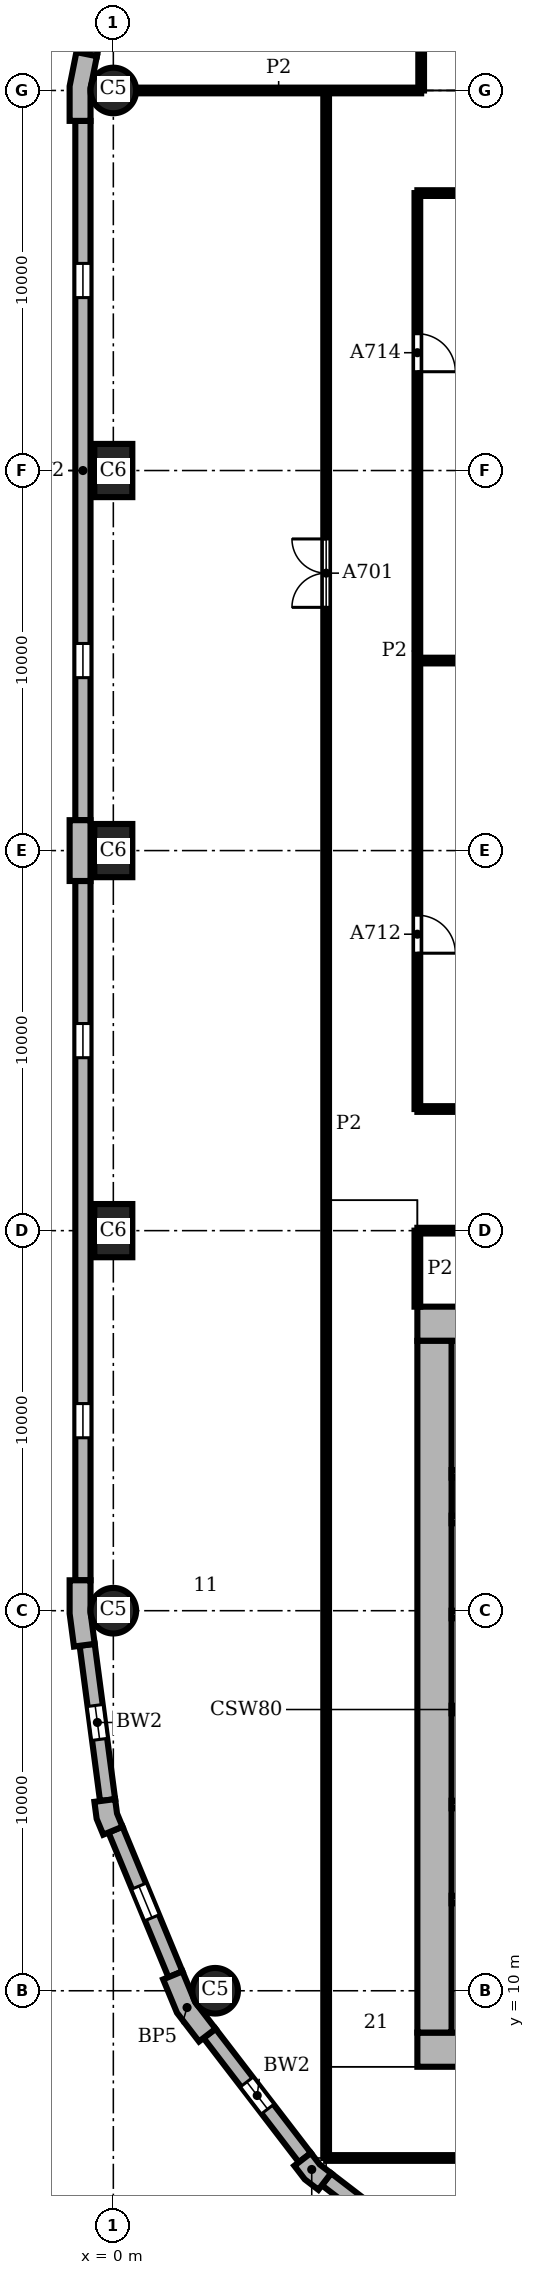
"""IFC4 building model, lengths in metres.
Left out: names, types, materials, properties, quantities, classifications, styles, units other than length and angle.
Written with IfcOpenShell. Run it as: python <this file> out.ifc"""

import sys

from ifc_helpers import new_model, si_unit, direction, frame, frame_2d, origin, origin_2d, place, context, subcontext, project, spatial, polyline, rectangle, circle, outline, extrude, element, fill, save


model = new_model("IFC4")
c1 = context("Model", 3, precision=1e-05, world=origin(), true_north=direction((0.0, 1.0)))
c2 = subcontext(c1, "Body", "Model", "MODEL_VIEW")
j1 = project(units=[si_unit("LENGTHUNIT", "METRE"), si_unit("PLANEANGLEUNIT", "RADIAN")], contexts=[c1])
p1 = place(None, origin())
s1 = spatial("IfcSite", under=j1, at=p1, CompositionType="ELEMENT")
p2 = place(p1, origin())
s2 = spatial("IfcBuilding", under=s1, at=p2, CompositionType="ELEMENT")
p3 = place(p2, frame((0.0, 0.0, 82.2)))
s3 = spatial("IfcBuildingStorey", under=s2, at=p3, CompositionType="ELEMENT", Elevation=82.2)
p4 = place(p3, frame((0.0, 60.0, 0.0), z_axis=(0.0, 0.0, 1.0), x_axis=(1.0, 0.0, 0.0)))
e1 = element("IfcColumn", 1, at=p4, inside=s3, PredefinedType="COLUMN", context=c2, shape_type="SweptSolid", body=[
    extrude(circle(Radius=0.6, at=origin_2d()), origin(), (0.0, 0.0, 1.0), 3.9),
])
for number, where, z_axis, x_axis in (
    (2, (0.0, 50.0, 0.0), (0.0, 0.0, 1.0), (0.0, 1.0, 0.0)),
    (3, (0.0, 40.0, 0.0), (0.0, 0.0, 1.0), (0.0, 1.0, 0.0)),
    (4, (0.0, 30.0, 0.0), (0.0, 0.0, 1.0), (0.0, 1.0, 0.0)),
):
    element("IfcColumn", number, at=place(p3, frame(where, z_axis=z_axis, x_axis=x_axis)), inside=s3, PredefinedType="COLUMN", context=c2, shape_type="SweptSolid", body=[
        extrude(rectangle(XDim=1.4, YDim=1.0, at=origin_2d()), origin(), (0.0, 0.0, 1.0), 3.9),
    ])
for number, where, z_axis, x_axis in (
    (5, (0.0, 20.0, 0.0), (0.0, 0.0, 1.0), (1.0, 0.0, 0.0)),
    (6, (2.679, 10.0, 0.0), (0.0, 0.0, 1.0), (1.0, 0.0, 0.0)),
):
    element("IfcColumn", number, at=place(p3, frame(where, z_axis=z_axis, x_axis=x_axis)), inside=s3, PredefinedType="COLUMN", context=c2, shape_type="SweptSolid", body=[
        extrude(circle(Radius=0.6, at=origin_2d()), origin(), (0.0, 0.0, 1.0), 3.9),
    ])
for number, where, z_axis, x_axis in (
    (7, (8.0, 8.45, 0.0), (0.0, 0.0, 1.0), (1.0, 0.0, 0.0)),
    (8, (28.0, 27.55, 0.0), (0.0, 0.0, 1.0), (-1.0, 0.0, 0.0)),
):
    element("IfcWall", number, at=place(p3, frame(where, z_axis=z_axis, x_axis=x_axis)), inside=s3, PredefinedType="SHEAR", context=c2, shape_type="SweptSolid", body=[
        extrude(rectangle(XDim=20.0, YDim=0.9, at=frame_2d((10.0, 0.0))), origin(), (0.0, 0.0, 1.0), 3.9),
    ])
p5 = place(p3, frame((8.45, 27.1, 0.0), z_axis=(0.0, 0.0, 1.0), x_axis=(0.0, -1.0, 0.0)))
e9 = element("IfcWall", 9, at=p5, inside=s3, PredefinedType="SHEAR", context=c2, shape_type="SweptSolid", body=[
    extrude(rectangle(XDim=18.2, YDim=0.9, at=frame_2d((9.1, 0.0))), origin(), (0.0, 0.0, 1.0), 3.9),
])
p6 = place(p3, origin())
e10 = element("IfcWall", 10, at=p6, inside=s3, PredefinedType="SOLIDWALL", context=c2, shape_type="SweptSolid", body=[
    extrude(outline(polyline([(-0.825, 60.98), (-0.972, 61.009), (-1.15, 60.113), (-1.15, 59.2), (-1.0, 59.2), (-0.6, 59.2), (-0.6, 60.059), (-0.432, 60.902), (-0.825, 60.98)])), origin(), (0.0, 0.0, 1.0), 3.9),
])
e11 = element("IfcWall", 11, at=p6, inside=s3, PredefinedType="SOLIDWALL", context=c2, shape_type="SweptSolid", body=[
    extrude(outline(polyline([(-1.0, 40.8), (-1.15, 40.8), (-1.15, 40.0), (-1.15, 39.2), (-1.0, 39.2), (-0.6, 39.2), (-0.6, 40.0), (-0.6, 40.8), (-1.0, 40.8)])), origin(), (0.0, 0.0, 1.0), 3.9),
])
e12 = element("IfcWall", 12, at=p6, inside=s3, PredefinedType="SOLIDWALL", context=c2, shape_type="SweptSolid", body=[
    extrude(outline(polyline([(-1.0, 20.8), (-1.15, 20.8), (-1.15, 19.925), (-1.036, 19.057), (-0.887, 19.076), (-0.49, 19.128), (-0.6, 19.961), (-0.6, 20.8), (-1.0, 20.8)])), origin(), (0.0, 0.0, 1.0), 3.9),
])
e13 = element("IfcWall", 13, at=p6, inside=s3, PredefinedType="SOLIDWALL", context=c2, shape_type="SweptSolid", body=[
    extrude(outline(polyline([(-0.349, 14.99), (-0.498, 14.971), (-0.439, 14.523), (-0.266, 14.106), (-0.128, 14.164), (0.242, 14.317), (0.097, 14.667), (0.047, 15.043), (-0.349, 14.99)])), origin(), (0.0, 0.0, 1.0), 3.9),
])
e14 = element("IfcWall", 14, at=p6, inside=s3, PredefinedType="SOLIDWALL", context=c2, shape_type="SweptSolid", body=[
    extrude(outline(polyline([(1.449, 10.356), (1.311, 10.299), (1.675, 9.42), (2.254, 8.665), (2.373, 8.757), (2.69, 9.0), (2.155, 9.698), (1.819, 10.51), (1.449, 10.356)])), origin(), (0.0, 0.0, 1.0), 3.9),
])
e15 = element("IfcWall", 15, at=p6, inside=s3, PredefinedType="SOLIDWALL", context=c2, shape_type="SweptSolid", body=[
    extrude(outline(polyline([(4.882, 5.487), (4.763, 5.396), (5.038, 5.038), (5.396, 4.763), (5.487, 4.882), (5.731, 5.199), (5.43, 5.43), (5.199, 5.731), (4.882, 5.487)])), origin(), (0.0, 0.0, 1.0), 3.9),
])
p7 = place(p3, frame((0.299, 65.602, 0.0), z_axis=(0.0, 0.0, 1.0), x_axis=(-0.195098533057, -0.98078364709, 0.0)))
e16 = element("IfcWall", 16, at=p7, inside=s3, PredefinedType="SOLIDWALL", context=c2, shape_type="SweptSolid", body=[
    extrude(rectangle(XDim=4.753, YDim=0.4, at=frame_2d((2.376, 0.0))), origin(), (0.0, 0.0, 1.0), 3.9),
])
p8 = place(p7, frame((0.226, 0.0, 0.9)))
e17 = element("IfcOpeningElement", 17, at=p8, cuts=e16, PredefinedType="OPENING", context=c2, shape_type="SweptSolid", body=[
    extrude(rectangle(XDim=4.3, YDim=2.35, at=frame_2d((2.15, 1.175))), frame((0.0, 0.21, 0.0), z_axis=(0.0, -1.0, 0.0), x_axis=(1.0, 0.0, 0.0)), (0.0, 0.0, 1.0), 0.42),
])
p9 = place(p3, frame((-0.8, 59.2, 0.0), z_axis=(0.0, 0.0, 1.0), x_axis=(0.0, -1.0, 0.0)))
e18 = element("IfcWall", 18, at=p9, inside=s3, PredefinedType="SOLIDWALL", context=c2, shape_type="SweptSolid", body=[
    extrude(rectangle(XDim=18.4, YDim=0.4, at=frame_2d((9.2, 0.0))), origin(), (0.0, 0.0, 1.0), 3.9),
])
p10 = place(p9, frame((3.75, 0.0, 0.9)))
e19 = element("IfcOpeningElement", 19, at=p10, cuts=e18, PredefinedType="OPENING", context=c2, shape_type="SweptSolid", body=[
    extrude(rectangle(XDim=0.9, YDim=2.35, at=frame_2d((0.45, 1.175))), frame((0.0, 0.21, 0.0), z_axis=(0.0, -1.0, 0.0), x_axis=(1.0, 0.0, 0.0)), (0.0, 0.0, 1.0), 0.42),
])
p11 = place(p9, frame((13.75, 0.0, 0.9)))
e20 = element("IfcOpeningElement", 20, at=p11, cuts=e18, PredefinedType="OPENING", context=c2, shape_type="SweptSolid", body=[
    extrude(rectangle(XDim=0.9, YDim=2.35, at=frame_2d((0.45, 1.175))), frame((0.0, 0.21, 0.0), z_axis=(0.0, -1.0, 0.0), x_axis=(1.0, 0.0, 0.0)), (0.0, 0.0, 1.0), 0.42),
])
p12 = place(p3, frame((-0.8, 39.2, 0.0), z_axis=(0.0, 0.0, 1.0), x_axis=(0.0, -1.0, 0.0)))
e21 = element("IfcWall", 21, at=p12, inside=s3, PredefinedType="SOLIDWALL", context=c2, shape_type="SweptSolid", body=[
    extrude(rectangle(XDim=18.4, YDim=0.4, at=frame_2d((9.2, 0.0))), origin(), (0.0, 0.0, 1.0), 3.9),
])
p13 = place(p12, frame((3.75, 0.0, 0.9)))
e22 = element("IfcOpeningElement", 22, at=p13, cuts=e21, PredefinedType="OPENING", context=c2, shape_type="SweptSolid", body=[
    extrude(rectangle(XDim=0.9, YDim=2.35, at=frame_2d((0.45, 1.175))), frame((0.0, 0.21, 0.0), z_axis=(0.0, -1.0, 0.0), x_axis=(1.0, 0.0, 0.0)), (0.0, 0.0, 1.0), 0.42),
])
p14 = place(p12, frame((13.75, 0.0, 0.9)))
e23 = element("IfcOpeningElement", 23, at=p14, cuts=e21, PredefinedType="OPENING", context=c2, shape_type="SweptSolid", body=[
    extrude(rectangle(XDim=0.9, YDim=2.35, at=frame_2d((0.45, 1.175))), frame((0.0, 0.21, 0.0), z_axis=(0.0, -1.0, 0.0), x_axis=(1.0, 0.0, 0.0)), (0.0, 0.0, 1.0), 0.42),
])
p15 = place(p3, frame((-0.689, 19.102, 0.0), z_axis=(0.0, 0.0, 1.0), x_axis=(0.130514280502, -0.991446429508, 0.0)))
e24 = element("IfcWall", 24, at=p15, inside=s3, PredefinedType="SOLIDWALL", context=c2, shape_type="SweptSolid", body=[
    extrude(rectangle(XDim=4.121, YDim=0.4, at=frame_2d((2.061, 0.0))), origin(), (0.0, 0.0, 1.0), 3.9),
])
p16 = place(p15, frame((1.611, 0.0, 0.9)))
e25 = element("IfcOpeningElement", 25, at=p16, cuts=e24, PredefinedType="OPENING", context=c2, shape_type="SweptSolid", body=[
    extrude(rectangle(XDim=0.9, YDim=2.35, at=frame_2d((0.45, 1.175))), frame((0.0, 0.21, 0.0), z_axis=(0.0, -1.0, 0.0), x_axis=(1.0, 0.0, 0.0)), (0.0, 0.0, 1.0), 0.42),
])
p17 = place(p3, frame((0.057, 14.24, 0.0), z_axis=(0.0, 0.0, 1.0), x_axis=(0.382721546029, -0.923863744394, 0.0)))
e26 = element("IfcWall", 26, at=p17, inside=s3, PredefinedType="SOLIDWALL", context=c2, shape_type="SweptSolid", body=[
    extrude(rectangle(XDim=4.121, YDim=0.4, at=frame_2d((2.061, 0.0))), origin(), (0.0, 0.0, 1.0), 3.9),
])
p18 = place(p17, frame((1.611, 0.0, 0.9)))
e27 = element("IfcOpeningElement", 27, at=p18, cuts=e26, PredefinedType="OPENING", context=c2, shape_type="SweptSolid", body=[
    extrude(rectangle(XDim=0.9, YDim=2.35, at=frame_2d((0.45, 1.175))), frame((0.0, 0.21, 0.0), z_axis=(0.0, -1.0, 0.0), x_axis=(1.0, 0.0, 0.0)), (0.0, 0.0, 1.0), 0.42),
])
p19 = place(p3, frame((2.532, 8.878, 0.0), z_axis=(0.0, 0.0, 1.0), x_axis=(0.608759824817, -0.793354571229, 0.0)))
e28 = element("IfcWall", 28, at=p19, inside=s3, PredefinedType="SOLIDWALL", context=c2, shape_type="SweptSolid", body=[
    extrude(rectangle(XDim=4.121, YDim=0.4, at=frame_2d((2.061, 0.0))), origin(), (0.0, 0.0, 1.0), 3.9),
])
p20 = place(p19, frame((1.611, 0.0, 0.9)))
e29 = element("IfcOpeningElement", 29, at=p20, cuts=e28, PredefinedType="OPENING", context=c2, shape_type="SweptSolid", body=[
    extrude(rectangle(XDim=0.9, YDim=2.35, at=frame_2d((0.45, 1.175))), frame((0.0, 0.21, 0.0), z_axis=(0.0, -1.0, 0.0), x_axis=(1.0, 0.0, 0.0)), (0.0, 0.0, 1.0), 0.42),
])
p21 = place(p3, frame((5.609, 5.041, 0.0), z_axis=(0.0, 0.0, 1.0), x_axis=(0.793354571229, -0.608759824817, 0.0)))
e30 = element("IfcWall", 30, at=p21, inside=s3, PredefinedType="SOLIDWALL", context=c2, shape_type="SweptSolid", body=[
    extrude(rectangle(XDim=4.121, YDim=0.4, at=frame_2d((2.061, 0.0))), origin(), (0.0, 0.0, 1.0), 3.9),
])
p22 = place(p21, frame((1.611, 0.0, 0.9)))
e31 = element("IfcOpeningElement", 31, at=p22, cuts=e30, PredefinedType="OPENING", context=c2, shape_type="SweptSolid", body=[
    extrude(rectangle(XDim=0.9, YDim=2.35, at=frame_2d((0.45, 1.175))), frame((0.0, 0.21, 0.0), z_axis=(0.0, -1.0, 0.0), x_axis=(1.0, 0.0, 0.0)), (0.0, 0.0, 1.0), 0.42),
])
p23 = place(p3, frame((8.9, 12.4, 0.0), z_axis=(0.0, 0.0, 1.0), x_axis=(1.0, 0.0, 0.0)))
e32 = element("IfcWall", 32, at=p23, inside=s3, PredefinedType="SHEAR", context=c2, shape_type="SweptSolid", body=[
    extrude(rectangle(XDim=4.9, YDim=0.2, at=frame_2d((2.45, 0.0))), origin(), (0.0, 0.0, 1.0), 3.58),
])
for number, where, z_axis, x_axis in (
    (33, (8.9, 14.9, 0.0), (0.0, 0.0, 1.0), (1.0, 0.0, 0.0)),
    (34, (8.9, 17.4, 0.0), (0.0, 0.0, 1.0), (1.0, 0.0, 0.0)),
    (35, (8.9, 19.9, 0.0), (0.0, 0.0, 1.0), (1.0, 0.0, 0.0)),
    (36, (8.9, 22.4, 0.0), (0.0, 0.0, 1.0), (1.0, 0.0, 0.0)),
):
    element("IfcWall", number, at=place(p3, frame(where, z_axis=z_axis, x_axis=x_axis)), inside=s3, PredefinedType="SHEAR", context=c2, shape_type="SweptSolid", body=[
        extrude(rectangle(XDim=2.8, YDim=0.2, at=frame_2d((1.4, 0.0))), origin(), (0.0, 0.0, 1.0), 3.58),
    ])
p24 = place(p3, frame((8.9, 23.6, 0.0), z_axis=(0.0, 0.0, 1.0), x_axis=(1.0, 0.0, 0.0)))
e37 = element("IfcWall", 37, at=p24, inside=s3, PredefinedType="SHEAR", context=c2, shape_type="SweptSolid", body=[
    extrude(rectangle(XDim=4.9, YDim=0.2, at=frame_2d((2.45, 0.0))), origin(), (0.0, 0.0, 1.0), 3.58),
])
p25 = place(p3, frame((5.6, 5.6, 0.0), z_axis=(0.0, 0.0, 1.0), x_axis=(0.0, 1.0, 0.0)))
e38 = element("IfcWall", 38, at=p25, inside=s3, PredefinedType="PARTITIONING", context=c2, shape_type="SweptSolid", body=[
    extrude(rectangle(XDim=54.4, YDim=0.15, at=frame_2d((27.2, 0.0))), origin(), (0.0, 0.0, 1.0), 3.58),
])
p26 = place(p25, frame((40.8, 0.0, 0.0)))
e39 = element("IfcOpeningElement", 39, at=p26, cuts=e38, PredefinedType="OPENING", context=c2, shape_type="SweptSolid", body=[
    extrude(rectangle(XDim=1.8, YDim=2.1, at=frame_2d((0.9, 1.05))), frame((0.0, 0.085, 0.0), z_axis=(0.0, -1.0, 0.0), x_axis=(1.0, 0.0, 0.0)), (0.0, 0.0, 1.0), 0.17),
])
p27 = place(p3, frame((8.0, 28.0, 0.0), z_axis=(0.0, 0.0, 1.0), x_axis=(0.0, 1.0, 0.0)))
e40 = element("IfcWall", 40, at=p27, inside=s3, PredefinedType="PARTITIONING", context=c2, shape_type="SweptSolid", body=[
    extrude(rectangle(XDim=2.0, YDim=0.15, at=frame_2d((1.0, 0.0))), origin(), (0.0, 0.0, 1.0), 3.58),
])
p28 = place(p3, frame((8.0, 33.2, 0.0), z_axis=(0.0, 0.0, 1.0), x_axis=(0.0, 1.0, 0.0)))
e41 = element("IfcWall", 41, at=p28, inside=s3, PredefinedType="PARTITIONING", context=c2, shape_type="SweptSolid", body=[
    extrude(rectangle(XDim=24.1, YDim=0.15, at=frame_2d((12.05, 0.0))), origin(), (0.0, 0.0, 1.0), 3.58),
])
p29 = place(p28, frame((4.1, 0.0, 0.0)))
e42 = element("IfcOpeningElement", 42, at=p29, cuts=e41, PredefinedType="OPENING", context=c2, shape_type="SweptSolid", body=[
    extrude(rectangle(XDim=1.0, YDim=2.1, at=frame_2d((0.5, 1.05))), frame((0.0, 0.085, 0.0), z_axis=(0.0, -1.0, 0.0), x_axis=(1.0, 0.0, 0.0)), (0.0, 0.0, 1.0), 0.17),
])
p30 = place(p28, frame((19.4, 0.0, 0.0)))
e43 = element("IfcOpeningElement", 43, at=p30, cuts=e41, PredefinedType="OPENING", context=c2, shape_type="SweptSolid", body=[
    extrude(rectangle(XDim=1.0, YDim=2.1, at=frame_2d((0.5, 1.05))), frame((0.0, 0.085, 0.0), z_axis=(0.0, -1.0, 0.0), x_axis=(1.0, 0.0, 0.0)), (0.0, 0.0, 1.0), 0.17),
])
p31 = place(p3, frame((8.1, 60.0, 0.0), z_axis=(0.0, 0.0, 1.0), x_axis=(0.0, 1.0, 0.0)))
e44 = element("IfcWall", 44, at=p31, inside=s3, PredefinedType="PARTITIONING", context=c2, shape_type="SweptSolid", body=[
    extrude(rectangle(XDim=6.4, YDim=0.15, at=frame_2d((3.2, 0.0))), origin(), (0.0, 0.0, 1.0), 3.58),
])
p32 = place(p31, frame((2.85, 0.0, 0.0)))
e45 = element("IfcOpeningElement", 45, at=p32, cuts=e44, PredefinedType="OPENING", context=c2, shape_type="SweptSolid", body=[
    extrude(rectangle(XDim=1.0, YDim=2.1, at=frame_2d((0.5, 1.05))), frame((0.0, 0.085, 0.0), z_axis=(0.0, -1.0, 0.0), x_axis=(1.0, 0.0, 0.0)), (0.0, 0.0, 1.0), 0.17),
])
p33 = place(p3, frame((5.6, 5.6, 0.0), z_axis=(0.0, 0.0, 1.0), x_axis=(1.0, 0.0, 0.0)))
e46 = element("IfcWall", 46, at=p33, inside=s3, PredefinedType="PARTITIONING", context=c2, shape_type="SweptSolid", body=[
    extrude(rectangle(XDim=25.4, YDim=0.15, at=frame_2d((12.7, 0.0))), origin(), (0.0, 0.0, 1.0), 3.58),
])
p34 = place(p33, frame((4.6, 0.0, 0.0)))
e47 = element("IfcOpeningElement", 47, at=p34, cuts=e46, PredefinedType="OPENING", context=c2, shape_type="SweptSolid", body=[
    extrude(rectangle(XDim=1.0, YDim=2.1, at=frame_2d((0.5, 1.05))), frame((0.0, 0.085, 0.0), z_axis=(0.0, -1.0, 0.0), x_axis=(1.0, 0.0, 0.0)), (0.0, 0.0, 1.0), 0.17),
])
p35 = place(p33, frame((11.0, 0.0, 0.0)))
e48 = element("IfcOpeningElement", 48, at=p35, cuts=e46, PredefinedType="OPENING", context=c2, shape_type="SweptSolid", body=[
    extrude(rectangle(XDim=0.8, YDim=2.1, at=frame_2d((0.4, 1.05))), frame((0.0, 0.085, 0.0), z_axis=(0.0, -1.0, 0.0), x_axis=(1.0, 0.0, 0.0)), (0.0, 0.0, 1.0), 0.17),
])
p36 = place(p33, frame((20.0, 0.0, 0.0)))
e49 = element("IfcOpeningElement", 49, at=p36, cuts=e46, PredefinedType="OPENING", context=c2, shape_type="SweptSolid", body=[
    extrude(rectangle(XDim=1.0, YDim=2.1, at=frame_2d((0.5, 1.05))), frame((0.0, 0.085, 0.0), z_axis=(0.0, -1.0, 0.0), x_axis=(1.0, 0.0, 0.0)), (0.0, 0.0, 1.0), 0.17),
])
p37 = place(p3, frame((8.0, 30.0, 0.0), z_axis=(0.0, 0.0, 1.0), x_axis=(1.0, 0.0, 0.0)))
e50 = element("IfcWall", 50, at=p37, inside=s3, PredefinedType="PARTITIONING", context=c2, shape_type="SweptSolid", body=[
    extrude(rectangle(XDim=1.2, YDim=0.15, at=frame_2d((0.6, 0.0))), origin(), (0.0, 0.0, 1.0), 3.58),
])
for number, where, z_axis, x_axis in (
    (51, (8.0, 33.2, 0.0), (0.0, 0.0, 1.0), (1.0, 0.0, 0.0)),
    (52, (8.0, 45.0, 0.0), (0.0, 0.0, 1.0), (1.0, 0.0, 0.0)),
    (53, (8.0, 57.3, 0.0), (0.0, 0.0, 1.0), (1.0, 0.0, 0.0)),
):
    element("IfcWall", number, at=place(p3, frame(where, z_axis=z_axis, x_axis=x_axis)), inside=s3, PredefinedType="PARTITIONING", context=c2, shape_type="SweptSolid", body=[
        extrude(rectangle(XDim=5.8, YDim=0.15, at=frame_2d((2.9, 0.0))), origin(), (0.0, 0.0, 1.0), 3.58),
    ])
p38 = place(p3, frame((0.6, 60.0, 0.0), z_axis=(0.0, 0.0, 1.0), x_axis=(1.0, 0.0, 0.0)))
e54 = element("IfcWall", 54, at=p38, inside=s3, PredefinedType="PARTITIONING", context=c2, shape_type="SweptSolid", body=[
    extrude(rectangle(XDim=7.5, YDim=0.15, at=frame_2d((3.75, 0.0))), origin(), (0.0, 0.0, 1.0), 3.58),
])
p39 = place(p10, origin())
e55 = element("IfcWindow", 55, at=p39, inside=s3, PartitioningType="SINGLE_PANEL", PredefinedType="WINDOW", context=c2, shape_type="SweptSolid", body=[
    extrude(rectangle(XDim=0.9, YDim=2.35, at=frame_2d((0.45, 1.175))), frame((0.0, 0.16, 0.0), z_axis=(0.0, -1.0, 0.0), x_axis=(1.0, 0.0, 0.0)), (0.0, 0.0, 1.0), 0.06),
])
fill(e19, e55)
p40 = place(p11, origin())
e56 = element("IfcWindow", 56, at=p40, inside=s3, PartitioningType="SINGLE_PANEL", PredefinedType="WINDOW", context=c2, shape_type="SweptSolid", body=[
    extrude(rectangle(XDim=0.9, YDim=2.35, at=frame_2d((0.45, 1.175))), frame((0.0, 0.16, 0.0), z_axis=(0.0, -1.0, 0.0), x_axis=(1.0, 0.0, 0.0)), (0.0, 0.0, 1.0), 0.06),
])
fill(e20, e56)
p41 = place(p13, origin())
e57 = element("IfcWindow", 57, at=p41, inside=s3, PartitioningType="SINGLE_PANEL", PredefinedType="WINDOW", context=c2, shape_type="SweptSolid", body=[
    extrude(rectangle(XDim=0.9, YDim=2.35, at=frame_2d((0.45, 1.175))), frame((0.0, 0.16, 0.0), z_axis=(0.0, -1.0, 0.0), x_axis=(1.0, 0.0, 0.0)), (0.0, 0.0, 1.0), 0.06),
])
fill(e22, e57)
p42 = place(p14, origin())
e58 = element("IfcWindow", 58, at=p42, inside=s3, PartitioningType="SINGLE_PANEL", PredefinedType="WINDOW", context=c2, shape_type="SweptSolid", body=[
    extrude(rectangle(XDim=0.9, YDim=2.35, at=frame_2d((0.45, 1.175))), frame((0.0, 0.16, 0.0), z_axis=(0.0, -1.0, 0.0), x_axis=(1.0, 0.0, 0.0)), (0.0, 0.0, 1.0), 0.06),
])
fill(e23, e58)
p43 = place(p16, origin())
e59 = element("IfcWindow", 59, at=p43, inside=s3, PartitioningType="SINGLE_PANEL", PredefinedType="WINDOW", context=c2, shape_type="SweptSolid", body=[
    extrude(rectangle(XDim=0.9, YDim=2.35, at=frame_2d((0.45, 1.175))), frame((0.0, 0.16, 0.0), z_axis=(0.0, -1.0, 0.0), x_axis=(1.0, 0.0, 0.0)), (0.0, 0.0, 1.0), 0.06),
])
fill(e25, e59)
p44 = place(p18, origin())
e60 = element("IfcWindow", 60, at=p44, inside=s3, PartitioningType="SINGLE_PANEL", PredefinedType="WINDOW", context=c2, shape_type="SweptSolid", body=[
    extrude(rectangle(XDim=0.9, YDim=2.35, at=frame_2d((0.45, 1.175))), frame((0.0, 0.16, 0.0), z_axis=(0.0, -1.0, 0.0), x_axis=(1.0, 0.0, 0.0)), (0.0, 0.0, 1.0), 0.06),
])
fill(e27, e60)
p45 = place(p20, origin())
e61 = element("IfcWindow", 61, at=p45, inside=s3, PartitioningType="SINGLE_PANEL", PredefinedType="WINDOW", context=c2, shape_type="SweptSolid", body=[
    extrude(rectangle(XDim=0.9, YDim=2.35, at=frame_2d((0.45, 1.175))), frame((0.0, 0.16, 0.0), z_axis=(0.0, -1.0, 0.0), x_axis=(1.0, 0.0, 0.0)), (0.0, 0.0, 1.0), 0.06),
])
fill(e29, e61)
p46 = place(p26, origin())
e62 = element("IfcDoor", 62, at=p46, inside=s3, OperationType="DOUBLE_DOOR_SINGLE_SWING", PredefinedType="DOOR", context=c2, shape_type="SweptSolid", body=[
    extrude(rectangle(XDim=1.8, YDim=2.1, at=frame_2d((0.9, 1.05))), frame((0.0, 0.025, 0.0), z_axis=(0.0, -1.0, 0.0), x_axis=(1.0, 0.0, 0.0)), (0.0, 0.0, 1.0), 0.05),
])
fill(e39, e62)
p47 = place(p29, frame((1.0, 0.0, 0.0), z_axis=(0.0, 0.0, 1.0), x_axis=(-1.0, 0.0, 0.0)))
e63 = element("IfcDoor", 63, at=p47, inside=s3, OperationType="SINGLE_SWING_RIGHT", PredefinedType="DOOR", context=c2, shape_type="SweptSolid", body=[
    extrude(rectangle(XDim=1.0, YDim=2.1, at=frame_2d((0.5, 1.05))), frame((0.0, 0.025, 0.0), z_axis=(0.0, -1.0, 0.0), x_axis=(1.0, 0.0, 0.0)), (0.0, 0.0, 1.0), 0.05),
])
fill(e42, e63)
p48 = place(p30, frame((1.0, 0.0, 0.0), z_axis=(0.0, 0.0, 1.0), x_axis=(-1.0, 0.0, 0.0)))
e64 = element("IfcDoor", 64, at=p48, inside=s3, OperationType="SINGLE_SWING_RIGHT", PredefinedType="DOOR", context=c2, shape_type="SweptSolid", body=[
    extrude(rectangle(XDim=1.0, YDim=2.1, at=frame_2d((0.5, 1.05))), frame((0.0, 0.025, 0.0), z_axis=(0.0, -1.0, 0.0), x_axis=(1.0, 0.0, 0.0)), (0.0, 0.0, 1.0), 0.05),
])
fill(e43, e64)
save(model, sys.argv[1])
